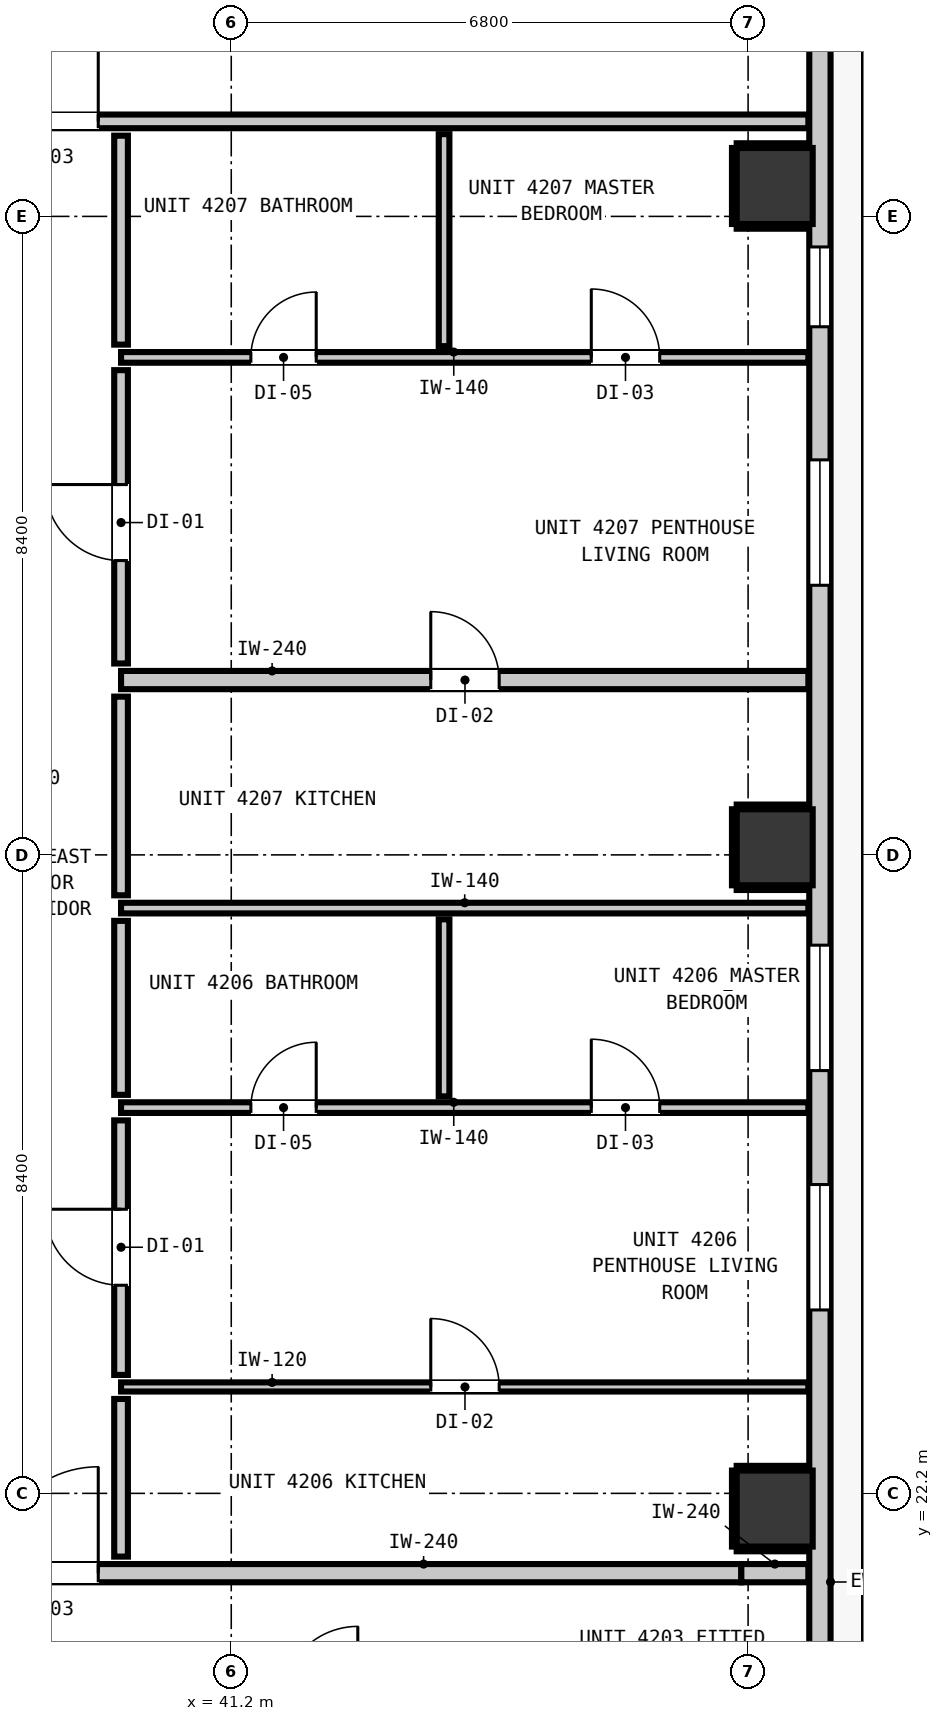
"""IFC4 building model, lengths in metres.
Left out: names, types, materials, properties, quantities, classifications, styles, units other than length and angle.
Written with IfcOpenShell. Run it as: python <this file> out.ifc"""

import sys

from ifc_helpers import new_model, si_unit, direction, frame, frame_2d, origin, origin_2d, place, context, subcontext, project, spatial, rectangle, extrude, element, fill, save


model = new_model("IFC4")
c1 = context("Model", 3, precision=1e-05, world=origin(), true_north=direction((0.0, 1.0)))
c2 = subcontext(c1, "Body", "Model", "MODEL_VIEW")
j1 = project(units=[si_unit("LENGTHUNIT", "METRE"), si_unit("PLANEANGLEUNIT", "RADIAN")], contexts=[c1])
p1 = place(None, origin())
s1 = spatial("IfcSite", under=j1, at=p1, CompositionType="ELEMENT")
p2 = place(p1, origin())
s2 = spatial("IfcBuilding", under=s1, at=p2, CompositionType="ELEMENT")
p3 = place(p2, frame((0.0, 0.0, 145.92)))
s3 = spatial("IfcBuildingStorey", under=s2, at=p3, CompositionType="ELEMENT", Elevation=145.92)
for number, where, z_axis, x_axis in (
    (1, (48.35, 22.0, -0.2), (0.0, 0.0, 1.0), (1.0, 0.0, 0.0)),
    (2, (48.35, 30.7, -0.2), (0.0, 0.0, 1.0), (1.0, 0.0, 0.0)),
    (3, (48.35, 39.4, -0.2), (0.0, 0.0, 1.0), (1.0, 0.0, 0.0)),
):
    element("IfcColumn", number, at=place(p3, frame(where, z_axis=z_axis, x_axis=x_axis)), inside=s3, PredefinedType="COLUMN", context=c2, shape_type="SweptSolid", body=[
        extrude(rectangle(XDim=1.0, YDim=1.0, at=origin_2d()), origin(), (0.0, 0.0, 1.0), 3.52),
    ])
p4 = place(p3, frame((48.945, 49.845, 0.0), z_axis=(0.0, 0.0, 1.0), x_axis=(0.0, -1.0, 0.0)))
e4 = element("IfcWall", 4, at=p4, inside=s3, PredefinedType="STANDARD", context=c2, shape_type="SweptSolid", body=[
    extrude(rectangle(XDim=32.29, YDim=0.28, at=frame_2d((16.145, 0.0))), origin(), (0.0, 0.0, 1.0), 3.08),
])
p5 = place(p4, frame((0.904, 0.0, 0.0)))
e5 = element("IfcOpeningElement", 5, at=p5, cuts=e4, PredefinedType="OPENING", context=c2, shape_type="SweptSolid", body=[
    extrude(rectangle(XDim=1.0, YDim=2.15, at=frame_2d((0.5, 1.075))), frame((0.0, 0.15, 0.0), z_axis=(0.0, -1.0, 0.0), x_axis=(1.0, 0.0, 0.0)), (0.0, 0.0, 1.0), 0.3),
])
p6 = place(p4, frame((2.774, 0.0, 0.85)))
e6 = element("IfcOpeningElement", 6, at=p6, cuts=e4, PredefinedType="OPENING", context=c2, shape_type="SweptSolid", body=[
    extrude(rectangle(XDim=1.65, YDim=1.75, at=frame_2d((0.825, 0.875))), frame((0.0, 0.15, 0.0), z_axis=(0.0, -1.0, 0.0), x_axis=(1.0, 0.0, 0.0)), (0.0, 0.0, 1.0), 0.3),
])
p7 = place(p4, frame((23.582, 0.0, 0.85)))
e7 = element("IfcOpeningElement", 7, at=p7, cuts=e4, PredefinedType="OPENING", context=c2, shape_type="SweptSolid", body=[
    extrude(rectangle(XDim=1.65, YDim=1.75, at=frame_2d((0.825, 0.875))), frame((0.0, 0.15, 0.0), z_axis=(0.0, -1.0, 0.0), x_axis=(1.0, 0.0, 0.0)), (0.0, 0.0, 1.0), 0.3),
])
p8 = place(p4, frame((20.433, 0.0, 0.85)))
e8 = element("IfcOpeningElement", 8, at=p8, cuts=e4, PredefinedType="OPENING", context=c2, shape_type="SweptSolid", body=[
    extrude(rectangle(XDim=1.65, YDim=1.75, at=frame_2d((0.825, 0.875))), frame((0.0, 0.15, 0.0), z_axis=(0.0, -1.0, 0.0), x_axis=(1.0, 0.0, 0.0)), (0.0, 0.0, 1.0), 0.3),
])
p9 = place(p4, frame((14.048, 0.0, 0.85)))
e9 = element("IfcOpeningElement", 9, at=p9, cuts=e4, PredefinedType="OPENING", context=c2, shape_type="SweptSolid", body=[
    extrude(rectangle(XDim=1.65, YDim=1.75, at=frame_2d((0.825, 0.875))), frame((0.0, 0.15, 0.0), z_axis=(0.0, -1.0, 0.0), x_axis=(1.0, 0.0, 0.0)), (0.0, 0.0, 1.0), 0.3),
])
p10 = place(p4, frame((11.247, 0.0, 0.85)))
e10 = element("IfcOpeningElement", 10, at=p10, cuts=e4, PredefinedType="OPENING", context=c2, shape_type="SweptSolid", body=[
    extrude(rectangle(XDim=1.05, YDim=1.65, at=frame_2d((0.525, 0.825))), frame((0.0, 0.15, 0.0), z_axis=(0.0, -1.0, 0.0), x_axis=(1.0, 0.0, 0.0)), (0.0, 0.0, 1.0), 0.3),
])
p11 = place(p3, frame((36.939, 21.15, 0.0), z_axis=(0.0, 0.0, 1.0), x_axis=(1.0, 0.0, 0.0)))
e11 = element("IfcWall", 11, at=p11, inside=s3, PredefinedType="PARTITIONING", context=c2, shape_type="SweptSolid", body=[
    extrude(rectangle(XDim=10.972, YDim=0.24, at=frame_2d((5.486, 0.0))), origin(), (0.0, 0.0, 1.0), 2.565),
])
p12 = place(p11, frame((1.111, 0.0, 0.0)))
e12 = element("IfcOpeningElement", 12, at=p12, cuts=e11, PredefinedType="OPENING", context=c2, shape_type="SweptSolid", body=[
    extrude(rectangle(XDim=1.4, YDim=2.15, at=frame_2d((0.7, 1.075))), frame((0.0, 0.13, 0.0), z_axis=(0.0, -1.0, 0.0), x_axis=(1.0, 0.0, 0.0)), (0.0, 0.0, 1.0), 0.26),
])
p13 = place(p3, frame((47.911, 21.15, 0.0), z_axis=(0.0, 0.0, 1.0), x_axis=(1.0, 0.0, 0.0)))
e13 = element("IfcWall", 13, at=p13, inside=s3, PredefinedType="PARTITIONING", context=c2, shape_type="SweptSolid", body=[
    extrude(rectangle(XDim=0.882, YDim=0.24, at=frame_2d((0.441, 0.0))), origin(), (0.0, 0.0, 1.0), 3.08),
])
p14 = place(p3, frame((39.75, 32.9, 0.0), z_axis=(0.0, 0.0, 1.0), x_axis=(1.0, 0.0, 0.0)))
e14 = element("IfcWall", 14, at=p14, inside=s3, PredefinedType="PARTITIONING", context=c2, shape_type="SweptSolid", body=[
    extrude(rectangle(XDim=9.043, YDim=0.24, at=frame_2d((4.521, 0.0))), origin(), (0.0, 0.0, 1.0), 3.08),
])
p15 = place(p14, frame((4.075, 0.0, 0.0)))
e15 = element("IfcOpeningElement", 15, at=p15, cuts=e14, PredefinedType="OPENING", context=c2, shape_type="SweptSolid", body=[
    extrude(rectangle(XDim=0.9, YDim=2.1, at=frame_2d((0.45, 1.05))), frame((0.0, 0.13, 0.0), z_axis=(0.0, -1.0, 0.0), x_axis=(1.0, 0.0, 0.0)), (0.0, 0.0, 1.0), 0.26),
])
p16 = place(p3, frame((9.407, 40.25, 0.0), z_axis=(0.0, 0.0, 1.0), x_axis=(1.0, 0.0, 0.0)))
e16 = element("IfcWall", 16, at=p16, inside=s3, PredefinedType="PARTITIONING", context=c2, shape_type="SweptSolid", body=[
    extrude(rectangle(XDim=39.386, YDim=0.18, at=frame_2d((19.693, 0.0))), origin(), (0.0, 0.0, 1.0), 3.08),
])
p17 = place(p16, frame((8.028, 0.0, 0.0)))
e17 = element("IfcOpeningElement", 17, at=p17, cuts=e16, PredefinedType="OPENING", context=c2, shape_type="SweptSolid", body=[
    extrude(rectangle(XDim=1.4, YDim=2.15, at=frame_2d((0.7, 1.075))), frame((0.0, 0.1, 0.0), z_axis=(0.0, -1.0, 0.0), x_axis=(1.0, 0.0, 0.0)), (0.0, 0.0, 1.0), 0.2),
])
p18 = place(p16, frame((1.192, 0.0, 0.0)))
e18 = element("IfcOpeningElement", 18, at=p18, cuts=e16, PredefinedType="OPENING", context=c2, shape_type="SweptSolid", body=[
    extrude(rectangle(XDim=1.4, YDim=2.15, at=frame_2d((0.7, 1.075))), frame((0.0, 0.1, 0.0), z_axis=(0.0, -1.0, 0.0), x_axis=(1.0, 0.0, 0.0)), (0.0, 0.0, 1.0), 0.2),
])
p19 = place(p16, frame((28.643, 0.0, 0.0)))
e19 = element("IfcOpeningElement", 19, at=p19, cuts=e16, PredefinedType="OPENING", context=c2, shape_type="SweptSolid", body=[
    extrude(rectangle(XDim=1.4, YDim=2.15, at=frame_2d((0.7, 1.075))), frame((0.0, 0.1, 0.0), z_axis=(0.0, -1.0, 0.0), x_axis=(1.0, 0.0, 0.0)), (0.0, 0.0, 1.0), 0.2),
])
p20 = place(p3, frame((39.75, 27.275, 0.0), z_axis=(0.0, 0.0, 1.0), x_axis=(1.0, 0.0, 0.0)))
e20 = element("IfcWall", 20, at=p20, inside=s3, PredefinedType="PARTITIONING", context=c2, shape_type="SweptSolid", body=[
    extrude(rectangle(XDim=9.043, YDim=0.14, at=frame_2d((4.521, 0.0))), origin(), (0.0, 0.0, 1.0), 3.08),
])
p21 = place(p20, frame((1.708, 0.0, 0.0)))
e21 = element("IfcOpeningElement", 21, at=p21, cuts=e20, PredefinedType="OPENING", context=c2, shape_type="SweptSolid", body=[
    extrude(rectangle(XDim=0.86, YDim=2.02, at=frame_2d((0.43, 1.01))), frame((0.0, 0.08, 0.0), z_axis=(0.0, -1.0, 0.0), x_axis=(1.0, 0.0, 0.0)), (0.0, 0.0, 1.0), 0.16),
])
p22 = place(p20, frame((6.187, 0.0, 0.0)))
e22 = element("IfcOpeningElement", 22, at=p22, cuts=e20, PredefinedType="OPENING", context=c2, shape_type="SweptSolid", body=[
    extrude(rectangle(XDim=0.9, YDim=2.1, at=frame_2d((0.45, 1.05))), frame((0.0, 0.08, 0.0), z_axis=(0.0, -1.0, 0.0), x_axis=(1.0, 0.0, 0.0)), (0.0, 0.0, 1.0), 0.16),
])
p23 = place(p3, frame((39.75, 29.9, 0.0), z_axis=(0.0, 0.0, 1.0), x_axis=(1.0, 0.0, 0.0)))
e23 = element("IfcWall", 23, at=p23, inside=s3, PredefinedType="PARTITIONING", context=c2, shape_type="SweptSolid", body=[
    extrude(rectangle(XDim=9.043, YDim=0.14, at=frame_2d((4.521, 0.0))), origin(), (0.0, 0.0, 1.0), 3.08),
])
p24 = place(p3, frame((39.75, 37.145, 0.0), z_axis=(0.0, 0.0, 1.0), x_axis=(1.0, 0.0, 0.0)))
e24 = element("IfcWall", 24, at=p24, inside=s3, PredefinedType="PARTITIONING", context=c2, shape_type="SweptSolid", body=[
    extrude(rectangle(XDim=9.043, YDim=0.14, at=frame_2d((4.521, 0.0))), origin(), (0.0, 0.0, 1.0), 3.08),
])
p25 = place(p24, frame((1.708, 0.0, 0.0)))
e25 = element("IfcOpeningElement", 25, at=p25, cuts=e24, PredefinedType="OPENING", context=c2, shape_type="SweptSolid", body=[
    extrude(rectangle(XDim=0.86, YDim=2.02, at=frame_2d((0.43, 1.01))), frame((0.0, 0.08, 0.0), z_axis=(0.0, -1.0, 0.0), x_axis=(1.0, 0.0, 0.0)), (0.0, 0.0, 1.0), 0.16),
])
p26 = place(p24, frame((6.187, 0.0, 0.0)))
e26 = element("IfcOpeningElement", 26, at=p26, cuts=e24, PredefinedType="OPENING", context=c2, shape_type="SweptSolid", body=[
    extrude(rectangle(XDim=0.9, YDim=2.1, at=frame_2d((0.45, 1.05))), frame((0.0, 0.08, 0.0), z_axis=(0.0, -1.0, 0.0), x_axis=(1.0, 0.0, 0.0)), (0.0, 0.0, 1.0), 0.16),
])
p27 = place(p3, frame((39.75, 23.6, 0.0), z_axis=(0.0, 0.0, 1.0), x_axis=(1.0, 0.0, 0.0)))
e27 = element("IfcWall", 27, at=p27, inside=s3, PredefinedType="PARTITIONING", context=c2, shape_type="SweptSolid", body=[
    extrude(rectangle(XDim=9.043, YDim=0.12, at=frame_2d((4.521, 0.0))), origin(), (0.0, 0.0, 1.0), 3.08),
])
p28 = place(p27, frame((4.075, 0.0, 0.0)))
e28 = element("IfcOpeningElement", 28, at=p28, cuts=e27, PredefinedType="OPENING", context=c2, shape_type="SweptSolid", body=[
    extrude(rectangle(XDim=0.9, YDim=2.1, at=frame_2d((0.45, 1.05))), frame((0.0, 0.07, 0.0), z_axis=(0.0, -1.0, 0.0), x_axis=(1.0, 0.0, 0.0)), (0.0, 0.0, 1.0), 0.14),
])
p29 = place(p3, frame((39.75, 21.368, 0.0), z_axis=(0.0, 0.0, 1.0), x_axis=(0.0, 1.0, 0.0)))
e29 = element("IfcWall", 29, at=p29, inside=s3, PredefinedType="PARTITIONING", context=c2, shape_type="SweptSolid", body=[
    extrude(rectangle(XDim=2.074, YDim=0.18, at=frame_2d((1.037, 0.0))), origin(), (0.0, 0.0, 1.0), 3.08),
])
p30 = place(p3, frame((39.75, 23.758, 0.0), z_axis=(0.0, 0.0, 1.0), x_axis=(0.0, 1.0, 0.0)))
e30 = element("IfcWall", 30, at=p30, inside=s3, PredefinedType="PARTITIONING", context=c2, shape_type="SweptSolid", body=[
    extrude(rectangle(XDim=3.349, YDim=0.18, at=frame_2d((1.674, 0.0))), origin(), (0.0, 0.0, 1.0), 3.08),
])
p31 = place(p30, frame((1.18, 0.0, 0.0)))
e31 = element("IfcOpeningElement", 31, at=p31, cuts=e30, PredefinedType="OPENING", context=c2, shape_type="SweptSolid", body=[
    extrude(rectangle(XDim=1.0, YDim=2.15, at=frame_2d((0.5, 1.075))), frame((0.0, 0.1, 0.0), z_axis=(0.0, -1.0, 0.0), x_axis=(1.0, 0.0, 0.0)), (0.0, 0.0, 1.0), 0.2),
])
p32 = place(p3, frame((39.75, 27.443, 0.0), z_axis=(0.0, 0.0, 1.0), x_axis=(0.0, 1.0, 0.0)))
e32 = element("IfcWall", 32, at=p32, inside=s3, PredefinedType="PARTITIONING", context=c2, shape_type="SweptSolid", body=[
    extrude(rectangle(XDim=2.289, YDim=0.18, at=frame_2d((1.145, 0.0))), origin(), (0.0, 0.0, 1.0), 3.08),
])
p33 = place(p3, frame((39.75, 30.068, 0.0), z_axis=(0.0, 0.0, 1.0), x_axis=(0.0, 1.0, 0.0)))
e33 = element("IfcWall", 33, at=p33, inside=s3, PredefinedType="PARTITIONING", context=c2, shape_type="SweptSolid", body=[
    extrude(rectangle(XDim=2.614, YDim=0.18, at=frame_2d((1.307, 0.0))), origin(), (0.0, 0.0, 1.0), 3.08),
])
p34 = place(p3, frame((39.75, 33.118, 0.0), z_axis=(0.0, 0.0, 1.0), x_axis=(0.0, 1.0, 0.0)))
e34 = element("IfcWall", 34, at=p34, inside=s3, PredefinedType="PARTITIONING", context=c2, shape_type="SweptSolid", body=[
    extrude(rectangle(XDim=3.859, YDim=0.18, at=frame_2d((1.93, 0.0))), origin(), (0.0, 0.0, 1.0), 3.08),
])
p35 = place(p34, frame((1.354, 0.0, 0.0)))
e35 = element("IfcOpeningElement", 35, at=p35, cuts=e34, PredefinedType="OPENING", context=c2, shape_type="SweptSolid", body=[
    extrude(rectangle(XDim=1.0, YDim=2.15, at=frame_2d((0.5, 1.075))), frame((0.0, 0.1, 0.0), z_axis=(0.0, -1.0, 0.0), x_axis=(1.0, 0.0, 0.0)), (0.0, 0.0, 1.0), 0.2),
])
p36 = place(p3, frame((39.75, 37.313, 0.0), z_axis=(0.0, 0.0, 1.0), x_axis=(0.0, 1.0, 0.0)))
e36 = element("IfcWall", 36, at=p36, inside=s3, PredefinedType="PARTITIONING", context=c2, shape_type="SweptSolid", body=[
    extrude(rectangle(XDim=2.749, YDim=0.18, at=frame_2d((1.375, 0.0))), origin(), (0.0, 0.0, 1.0), 3.08),
])
p37 = place(p3, frame((44.0, 27.423, 0.0), z_axis=(0.0, 0.0, 1.0), x_axis=(0.0, 1.0, 0.0)))
e37 = element("IfcWall", 37, at=p37, inside=s3, PredefinedType="PARTITIONING", context=c2, shape_type="SweptSolid", body=[
    extrude(rectangle(XDim=2.329, YDim=0.14, at=frame_2d((1.165, 0.0))), origin(), (0.0, 0.0, 1.0), 3.08),
])
p38 = place(p3, frame((44.0, 37.293, 0.0), z_axis=(0.0, 0.0, 1.0), x_axis=(0.0, 1.0, 0.0)))
e38 = element("IfcWall", 38, at=p38, inside=s3, PredefinedType="PARTITIONING", context=c2, shape_type="SweptSolid", body=[
    extrude(rectangle(XDim=2.789, YDim=0.14, at=frame_2d((1.395, 0.0))), origin(), (0.0, 0.0, 1.0), 3.08),
])
for number, where, z_axis, x_axis in (
    (39, (47.85, 21.468, 0.0), (0.0, 0.0, 1.0), (1.0, 0.0, 0.0)),
    (40, (47.85, 22.532, 0.0), (0.0, 0.0, 1.0), (1.0, 0.0, 0.0)),
):
    element("IfcWall", number, at=place(p3, frame(where, z_axis=z_axis, x_axis=x_axis)), inside=s3, PredefinedType="PARTITIONING", context=c2, shape_type="SweptSolid", body=[
        extrude(rectangle(XDim=0.94, YDim=0.06, at=frame_2d((0.47, 0.0))), origin(), (0.0, 0.0, 1.0), 1.45),
    ])
p39 = place(p3, frame((47.818, 21.5, 0.0), z_axis=(0.0, 0.0, 1.0), x_axis=(0.0, 1.0, 0.0)))
e41 = element("IfcWall", 41, at=p39, inside=s3, PredefinedType="PARTITIONING", context=c2, shape_type="SweptSolid", body=[
    extrude(rectangle(XDim=1.0, YDim=0.06, at=frame_2d((0.5, 0.0))), origin(), (0.0, 0.0, 1.0), 1.45),
])
for number, where, z_axis, x_axis in (
    (42, (47.85, 30.168, 0.0), (0.0, 0.0, 1.0), (1.0, 0.0, 0.0)),
    (43, (47.85, 31.232, 0.0), (0.0, 0.0, 1.0), (1.0, 0.0, 0.0)),
):
    element("IfcWall", number, at=place(p3, frame(where, z_axis=z_axis, x_axis=x_axis)), inside=s3, PredefinedType="PARTITIONING", context=c2, shape_type="SweptSolid", body=[
        extrude(rectangle(XDim=0.94, YDim=0.06, at=frame_2d((0.47, 0.0))), origin(), (0.0, 0.0, 1.0), 1.45),
    ])
p40 = place(p3, frame((47.818, 30.2, 0.0), z_axis=(0.0, 0.0, 1.0), x_axis=(0.0, 1.0, 0.0)))
e44 = element("IfcWall", 44, at=p40, inside=s3, PredefinedType="PARTITIONING", context=c2, shape_type="SweptSolid", body=[
    extrude(rectangle(XDim=1.0, YDim=0.06, at=frame_2d((0.5, 0.0))), origin(), (0.0, 0.0, 1.0), 1.45),
])
for number, where, z_axis, x_axis in (
    (45, (47.85, 38.868, 0.0), (0.0, 0.0, 1.0), (1.0, 0.0, 0.0)),
    (46, (47.85, 39.932, 0.0), (0.0, 0.0, 1.0), (1.0, 0.0, 0.0)),
):
    element("IfcWall", number, at=place(p3, frame(where, z_axis=z_axis, x_axis=x_axis)), inside=s3, PredefinedType="PARTITIONING", context=c2, shape_type="SweptSolid", body=[
        extrude(rectangle(XDim=0.94, YDim=0.06, at=frame_2d((0.47, 0.0))), origin(), (0.0, 0.0, 1.0), 1.45),
    ])
p41 = place(p3, frame((47.818, 38.9, 0.0), z_axis=(0.0, 0.0, 1.0), x_axis=(0.0, 1.0, 0.0)))
e47 = element("IfcWall", 47, at=p41, inside=s3, PredefinedType="PARTITIONING", context=c2, shape_type="SweptSolid", body=[
    extrude(rectangle(XDim=1.0, YDim=0.06, at=frame_2d((0.5, 0.0))), origin(), (0.0, 0.0, 1.0), 1.45),
])
p42 = place(p7, origin())
e48 = element("IfcWindow", 48, at=p42, inside=s3, PartitioningType="SINGLE_PANEL", PredefinedType="WINDOW", context=c2, shape_type="SweptSolid", body=[
    extrude(rectangle(XDim=1.65, YDim=1.75, at=frame_2d((0.825, 0.875))), frame((0.0, 0.03, 0.0), z_axis=(0.0, -1.0, 0.0), x_axis=(1.0, 0.0, 0.0)), (0.0, 0.0, 1.0), 0.06),
])
fill(e7, e48)
p43 = place(p8, origin())
e49 = element("IfcWindow", 49, at=p43, inside=s3, PartitioningType="SINGLE_PANEL", PredefinedType="WINDOW", context=c2, shape_type="SweptSolid", body=[
    extrude(rectangle(XDim=1.65, YDim=1.75, at=frame_2d((0.825, 0.875))), frame((0.0, 0.03, 0.0), z_axis=(0.0, -1.0, 0.0), x_axis=(1.0, 0.0, 0.0)), (0.0, 0.0, 1.0), 0.06),
])
fill(e8, e49)
p44 = place(p9, origin())
e50 = element("IfcWindow", 50, at=p44, inside=s3, PartitioningType="SINGLE_PANEL", PredefinedType="WINDOW", context=c2, shape_type="SweptSolid", body=[
    extrude(rectangle(XDim=1.65, YDim=1.75, at=frame_2d((0.825, 0.875))), frame((0.0, 0.03, 0.0), z_axis=(0.0, -1.0, 0.0), x_axis=(1.0, 0.0, 0.0)), (0.0, 0.0, 1.0), 0.06),
])
fill(e9, e50)
p45 = place(p10, origin())
e51 = element("IfcWindow", 51, at=p45, inside=s3, PartitioningType="SINGLE_PANEL", PredefinedType="WINDOW", context=c2, shape_type="SweptSolid", body=[
    extrude(rectangle(XDim=1.05, YDim=1.65, at=frame_2d((0.525, 0.825))), frame((0.0, 0.03, 0.0), z_axis=(0.0, -1.0, 0.0), x_axis=(1.0, 0.0, 0.0)), (0.0, 0.0, 1.0), 0.06),
])
fill(e10, e51)
p46 = place(p12, origin())
e52 = element("IfcDoor", 52, at=p46, inside=s3, OperationType="SINGLE_SWING_RIGHT", PredefinedType="DOOR", context=c2, shape_type="SweptSolid", body=[
    extrude(rectangle(XDim=1.4, YDim=2.15, at=frame_2d((0.7, 1.075))), frame((0.0, 0.025, 0.0), z_axis=(0.0, -1.0, 0.0), x_axis=(1.0, 0.0, 0.0)), (0.0, 0.0, 1.0), 0.05),
])
fill(e12, e52)
p47 = place(p19, origin())
e53 = element("IfcDoor", 53, at=p47, inside=s3, OperationType="SINGLE_SWING_RIGHT", PredefinedType="DOOR", context=c2, shape_type="SweptSolid", body=[
    extrude(rectangle(XDim=1.4, YDim=2.15, at=frame_2d((0.7, 1.075))), frame((0.0, 0.025, 0.0), z_axis=(0.0, -1.0, 0.0), x_axis=(1.0, 0.0, 0.0)), (0.0, 0.0, 1.0), 0.05),
])
fill(e19, e53)
p48 = place(p31, origin())
e54 = element("IfcDoor", 54, at=p48, inside=s3, OperationType="SINGLE_SWING_RIGHT", PredefinedType="DOOR", context=c2, shape_type="SweptSolid", body=[
    extrude(rectangle(XDim=1.0, YDim=2.15, at=frame_2d((0.5, 1.075))), frame((0.0, 0.025, 0.0), z_axis=(0.0, -1.0, 0.0), x_axis=(1.0, 0.0, 0.0)), (0.0, 0.0, 1.0), 0.05),
])
fill(e31, e54)
p49 = place(p28, origin())
e55 = element("IfcDoor", 55, at=p49, inside=s3, OperationType="SINGLE_SWING_LEFT", PredefinedType="DOOR", context=c2, shape_type="SweptSolid", body=[
    extrude(rectangle(XDim=0.9, YDim=2.1, at=frame_2d((0.45, 1.05))), frame((0.0, 0.025, 0.0), z_axis=(0.0, -1.0, 0.0), x_axis=(1.0, 0.0, 0.0)), (0.0, 0.0, 1.0), 0.05),
])
fill(e28, e55)
p50 = place(p21, origin())
e56 = element("IfcDoor", 56, at=p50, inside=s3, OperationType="SINGLE_SWING_RIGHT", PredefinedType="DOOR", context=c2, shape_type="SweptSolid", body=[
    extrude(rectangle(XDim=0.86, YDim=2.02, at=frame_2d((0.43, 1.01))), frame((0.0, 0.025, 0.0), z_axis=(0.0, -1.0, 0.0), x_axis=(1.0, 0.0, 0.0)), (0.0, 0.0, 1.0), 0.05),
])
fill(e21, e56)
p51 = place(p22, origin())
e57 = element("IfcDoor", 57, at=p51, inside=s3, OperationType="SINGLE_SWING_LEFT", PredefinedType="DOOR", context=c2, shape_type="SweptSolid", body=[
    extrude(rectangle(XDim=0.9, YDim=2.1, at=frame_2d((0.45, 1.05))), frame((0.0, 0.025, 0.0), z_axis=(0.0, -1.0, 0.0), x_axis=(1.0, 0.0, 0.0)), (0.0, 0.0, 1.0), 0.05),
])
fill(e22, e57)
p52 = place(p35, origin())
e58 = element("IfcDoor", 58, at=p52, inside=s3, OperationType="SINGLE_SWING_RIGHT", PredefinedType="DOOR", context=c2, shape_type="SweptSolid", body=[
    extrude(rectangle(XDim=1.0, YDim=2.15, at=frame_2d((0.5, 1.075))), frame((0.0, 0.025, 0.0), z_axis=(0.0, -1.0, 0.0), x_axis=(1.0, 0.0, 0.0)), (0.0, 0.0, 1.0), 0.05),
])
fill(e35, e58)
p53 = place(p15, origin())
e59 = element("IfcDoor", 59, at=p53, inside=s3, OperationType="SINGLE_SWING_LEFT", PredefinedType="DOOR", context=c2, shape_type="SweptSolid", body=[
    extrude(rectangle(XDim=0.9, YDim=2.1, at=frame_2d((0.45, 1.05))), frame((0.0, 0.025, 0.0), z_axis=(0.0, -1.0, 0.0), x_axis=(1.0, 0.0, 0.0)), (0.0, 0.0, 1.0), 0.05),
])
fill(e15, e59)
p54 = place(p25, origin())
e60 = element("IfcDoor", 60, at=p54, inside=s3, OperationType="SINGLE_SWING_RIGHT", PredefinedType="DOOR", context=c2, shape_type="SweptSolid", body=[
    extrude(rectangle(XDim=0.86, YDim=2.02, at=frame_2d((0.43, 1.01))), frame((0.0, 0.025, 0.0), z_axis=(0.0, -1.0, 0.0), x_axis=(1.0, 0.0, 0.0)), (0.0, 0.0, 1.0), 0.05),
])
fill(e25, e60)
p55 = place(p26, origin())
e61 = element("IfcDoor", 61, at=p55, inside=s3, OperationType="SINGLE_SWING_LEFT", PredefinedType="DOOR", context=c2, shape_type="SweptSolid", body=[
    extrude(rectangle(XDim=0.9, YDim=2.1, at=frame_2d((0.45, 1.05))), frame((0.0, 0.025, 0.0), z_axis=(0.0, -1.0, 0.0), x_axis=(1.0, 0.0, 0.0)), (0.0, 0.0, 1.0), 0.05),
])
fill(e26, e61)
save(model, sys.argv[1])
